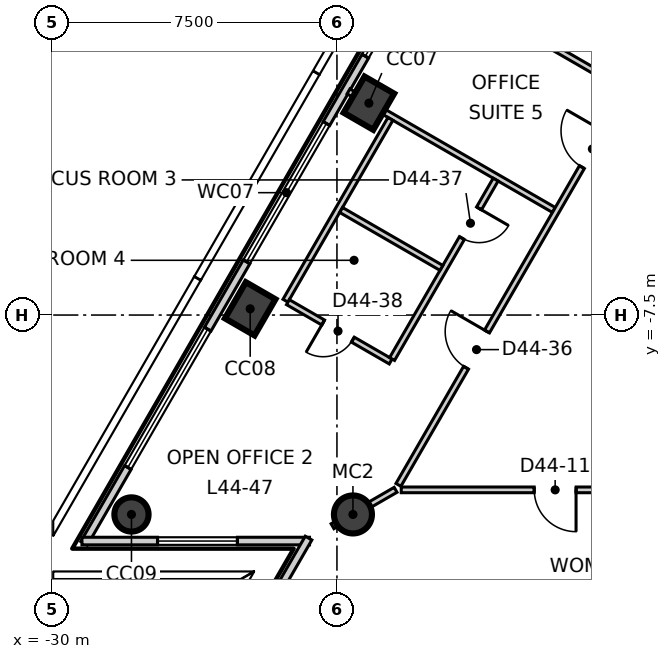
"""IFC4 building model, lengths in metres.
Left out: names, types, materials, properties, quantities, classifications, styles, units other than length and angle.
Written with IfcOpenShell. Run it as: python <this file> out.ifc"""

import sys

from ifc_helpers import new_model, si_unit, direction, frame, frame_2d, origin, origin_2d, place, context, subcontext, project, spatial, rectangle, circle, extrude, element, fill, save


model = new_model("IFC4")
c1 = context("Model", 3, precision=1e-05, world=origin(), true_north=direction((0.0, 1.0)))
c2 = subcontext(c1, "Body", "Model", "MODEL_VIEW")
j1 = project(units=[si_unit("LENGTHUNIT", "METRE"), si_unit("PLANEANGLEUNIT", "RADIAN")], contexts=[c1])
p1 = place(None, origin())
s1 = spatial("IfcSite", under=j1, at=p1, CompositionType="ELEMENT")
p2 = place(p1, origin())
s2 = spatial("IfcBuilding", under=s1, at=p2, CompositionType="ELEMENT")
p3 = place(p2, frame((0.0, 0.0, 191.3)))
s3 = spatial("IfcBuildingStorey", under=s2, at=p3, CompositionType="ELEMENT", Elevation=191.3)
for number, where, z_axis, x_axis in (
    (1, (-21.659, -1.925, -0.3), (0.0, 0.0, 1.0), (0.5, 0.866, 0.0)),
    (2, (-24.783, -7.336, -0.3), (0.0, 0.0, 1.0), (0.5, 0.866, 0.0)),
):
    element("IfcColumn", number, at=place(p3, frame(where, z_axis=z_axis, x_axis=x_axis)), inside=s3, PredefinedType="COLUMN", context=c2, shape_type="SweptSolid", body=[
        extrude(rectangle(XDim=1.1, YDim=0.9, at=origin_2d()), origin(), (0.0, 0.0, 1.0), 4.0),
    ])
p4 = place(p3, frame((-27.907, -12.747, -0.3), z_axis=(0.0, 0.0, 1.0), x_axis=(0.5, 0.866025403784, 0.0)))
e3 = element("IfcColumn", 3, at=p4, inside=s3, PredefinedType="COLUMN", context=c2, shape_type="SweptSolid", body=[
    extrude(circle(Radius=0.45, at=origin_2d()), origin(), (0.0, 0.0, 1.0), 4.0),
])
p5 = place(p3, frame((-22.079, -12.747, -0.3), z_axis=(0.0, 0.0, 1.0), x_axis=(1.0, 0.0, 0.0)))
e4 = element("IfcColumn", 4, at=p5, inside=s3, PredefinedType="COLUMN", context=c2, shape_type="SweptSolid", body=[
    extrude(circle(Radius=0.5, at=origin_2d()), origin(), (0.0, 0.0, 1.0), 4.0),
])
p6 = place(p3, frame((-2.869, 32.02, 0.0), z_axis=(0.0, 0.0, 1.0), x_axis=(-0.500006930241, -0.866021402571, 0.0)))
e5 = element("IfcWall", 5, at=p6, inside=s3, PredefinedType="ELEMENTEDWALL", context=c2, shape_type="SweptSolid", body=[
    extrude(rectangle(XDim=52.572, YDim=0.2, at=frame_2d((26.286, 0.0))), origin(), (0.0, 0.0, 1.0), 3.7),
])
p7 = place(p6, frame((2.327, 0.0, 0.9)))
e6 = element("IfcOpeningElement", 6, at=p7, cuts=e5, PredefinedType="OPENING", context=c2, shape_type="SweptSolid", body=[
    extrude(rectangle(XDim=4.2, YDim=2.5, at=frame_2d((2.1, 1.25))), frame((0.0, 0.11, 0.0), z_axis=(0.0, -1.0, 0.0), x_axis=(1.0, 0.0, 0.0)), (0.0, 0.0, 1.0), 0.22),
])
p8 = place(p6, frame((8.575, 0.0, 0.9)))
e7 = element("IfcOpeningElement", 7, at=p8, cuts=e5, PredefinedType="OPENING", context=c2, shape_type="SweptSolid", body=[
    extrude(rectangle(XDim=4.2, YDim=2.5, at=frame_2d((2.1, 1.25))), frame((0.0, 0.11, 0.0), z_axis=(0.0, -1.0, 0.0), x_axis=(1.0, 0.0, 0.0)), (0.0, 0.0, 1.0), 0.22),
])
p9 = place(p6, frame((14.823, 0.0, 0.9)))
e8 = element("IfcOpeningElement", 8, at=p9, cuts=e5, PredefinedType="OPENING", context=c2, shape_type="SweptSolid", body=[
    extrude(rectangle(XDim=4.2, YDim=2.5, at=frame_2d((2.1, 1.25))), frame((0.0, 0.11, 0.0), z_axis=(0.0, -1.0, 0.0), x_axis=(1.0, 0.0, 0.0)), (0.0, 0.0, 1.0), 0.22),
])
p10 = place(p6, frame((21.071, 0.0, 0.9)))
e9 = element("IfcOpeningElement", 9, at=p10, cuts=e5, PredefinedType="OPENING", context=c2, shape_type="SweptSolid", body=[
    extrude(rectangle(XDim=4.2, YDim=2.5, at=frame_2d((2.1, 1.25))), frame((0.0, 0.11, 0.0), z_axis=(0.0, -1.0, 0.0), x_axis=(1.0, 0.0, 0.0)), (0.0, 0.0, 1.0), 0.22),
])
p11 = place(p6, frame((27.319, 0.0, 0.9)))
e10 = element("IfcOpeningElement", 10, at=p11, cuts=e5, PredefinedType="OPENING", context=c2, shape_type="SweptSolid", body=[
    extrude(rectangle(XDim=4.2, YDim=2.5, at=frame_2d((2.1, 1.25))), frame((0.0, 0.11, 0.0), z_axis=(0.0, -1.0, 0.0), x_axis=(1.0, 0.0, 0.0)), (0.0, 0.0, 1.0), 0.22),
])
p12 = place(p6, frame((33.568, 0.0, 0.9)))
e11 = element("IfcOpeningElement", 11, at=p12, cuts=e5, PredefinedType="OPENING", context=c2, shape_type="SweptSolid", body=[
    extrude(rectangle(XDim=4.2, YDim=2.5, at=frame_2d((2.1, 1.25))), frame((0.0, 0.11, 0.0), z_axis=(0.0, -1.0, 0.0), x_axis=(1.0, 0.0, 0.0)), (0.0, 0.0, 1.0), 0.22),
])
p13 = place(p6, frame((39.816, 0.0, 0.9)))
e12 = element("IfcOpeningElement", 12, at=p13, cuts=e5, PredefinedType="OPENING", context=c2, shape_type="SweptSolid", body=[
    extrude(rectangle(XDim=4.2, YDim=2.5, at=frame_2d((2.1, 1.25))), frame((0.0, 0.11, 0.0), z_axis=(0.0, -1.0, 0.0), x_axis=(1.0, 0.0, 0.0)), (0.0, 0.0, 1.0), 0.22),
])
p14 = place(p6, frame((46.064, 0.0, 0.9)))
e13 = element("IfcOpeningElement", 13, at=p14, cuts=e5, PredefinedType="OPENING", context=c2, shape_type="SweptSolid", body=[
    extrude(rectangle(XDim=4.2, YDim=2.5, at=frame_2d((2.1, 1.25))), frame((0.0, 0.11, 0.0), z_axis=(0.0, -1.0, 0.0), x_axis=(1.0, 0.0, 0.0)), (0.0, 0.0, 1.0), 0.22),
])
p15 = place(p3, frame((-29.21, -13.447, 0.0), z_axis=(0.0, 0.0, 1.0), x_axis=(1.0, 0.0, 0.0)))
e14 = element("IfcWall", 14, at=p15, inside=s3, PredefinedType="ELEMENTEDWALL", context=c2, shape_type="SweptSolid", body=[
    extrude(rectangle(XDim=5.988, YDim=0.2, at=frame_2d((2.994, 0.0))), origin(), (0.0, 0.0, 1.0), 3.7),
])
p16 = place(p15, frame((1.99, 0.0, 0.9)))
e15 = element("IfcOpeningElement", 15, at=p16, cuts=e14, PredefinedType="OPENING", context=c2, shape_type="SweptSolid", body=[
    extrude(rectangle(XDim=2.1, YDim=2.5, at=frame_2d((1.05, 1.25))), frame((0.0, 0.11, 0.0), z_axis=(0.0, -1.0, 0.0), x_axis=(1.0, 0.0, 0.0)), (0.0, 0.0, 1.0), 0.22),
])
p17 = place(p3, frame((-23.247, -13.369, 0.0), z_axis=(0.0, 0.0, 1.0), x_axis=(-0.499896541353, -0.866085127423, 0.0)))
e16 = element("IfcWall", 16, at=p17, inside=s3, PredefinedType="ELEMENTEDWALL", context=c2, shape_type="SweptSolid", body=[
    extrude(rectangle(XDim=5.989, YDim=0.2, at=frame_2d((2.995, 0.0))), origin(), (0.0, 0.0, 1.0), 3.7),
])
p18 = place(p17, frame((1.39, 0.0, 0.9)))
e17 = element("IfcOpeningElement", 17, at=p18, cuts=e16, PredefinedType="OPENING", context=c2, shape_type="SweptSolid", body=[
    extrude(rectangle(XDim=2.1, YDim=2.5, at=frame_2d((1.05, 1.25))), frame((0.0, 0.11, 0.0), z_axis=(0.0, -1.0, 0.0), x_axis=(1.0, 0.0, 0.0)), (0.0, 0.0, 1.0), 0.22),
])
p19 = place(p3, frame((-22.616, -13.057, 0.0), z_axis=(0.0, 0.0, 1.0), x_axis=(0.866030650962, 0.499990911512, 0.0)))
e18 = element("IfcWall", 18, at=p19, inside=s3, PredefinedType="PARTITIONING", context=c2, shape_type="SweptSolid", body=[
    extrude(rectangle(XDim=1.916, YDim=0.15, at=frame_2d((0.958, 0.0))), origin(), (0.0, 0.0, 1.0), 3.2),
])
p20 = place(p3, frame((-22.196, -1.615, 0.0), z_axis=(0.0, 0.0, 1.0), x_axis=(0.86601944389, -0.500010322698, 0.0)))
e19 = element("IfcWall", 19, at=p20, inside=s3, PredefinedType="PARTITIONING", context=c2, shape_type="SweptSolid", body=[
    extrude(rectangle(XDim=6.24, YDim=0.15, at=frame_2d((3.12, 0.0))), origin(), (0.0, 0.0, 1.0), 3.7),
])
p21 = place(p3, frame((-20.882, -11.969, 0.0), z_axis=(0.0, 0.0, 1.0), x_axis=(0.499998738735, 0.866026131975, 0.0)))
e20 = element("IfcWall", 20, at=p21, inside=s3, PredefinedType="PARTITIONING", context=c2, shape_type="SweptSolid", body=[
    extrude(rectangle(XDim=41.764, YDim=0.15, at=frame_2d((20.882, 0.0))), origin(), (0.0, 0.0, 1.0), 3.7),
])
p22 = place(p21, frame((37.014, 0.0, 0.0)))
e21 = element("IfcOpeningElement", 21, at=p22, cuts=e20, PredefinedType="OPENING", context=c2, shape_type="SweptSolid", body=[
    extrude(rectangle(XDim=1.0, YDim=2.1, at=frame_2d((0.5, 1.05))), frame((0.0, 0.085, 0.0), z_axis=(0.0, -1.0, 0.0), x_axis=(1.0, 0.0, 0.0)), (0.0, 0.0, 1.0), 0.17),
])
p23 = place(p21, frame((29.653, 0.0, 0.0)))
e22 = element("IfcOpeningElement", 22, at=p23, cuts=e20, PredefinedType="OPENING", context=c2, shape_type="SweptSolid", body=[
    extrude(rectangle(XDim=1.0, YDim=2.1, at=frame_2d((0.5, 1.05))), frame((0.0, 0.085, 0.0), z_axis=(0.0, -1.0, 0.0), x_axis=(1.0, 0.0, 0.0)), (0.0, 0.0, 1.0), 0.17),
])
p24 = place(p21, frame((23.405, 0.0, 0.0)))
e23 = element("IfcOpeningElement", 23, at=p24, cuts=e20, PredefinedType="OPENING", context=c2, shape_type="SweptSolid", body=[
    extrude(rectangle(XDim=1.0, YDim=2.1, at=frame_2d((0.5, 1.05))), frame((0.0, 0.085, 0.0), z_axis=(0.0, -1.0, 0.0), x_axis=(1.0, 0.0, 0.0)), (0.0, 0.0, 1.0), 0.17),
])
p25 = place(p21, frame((9.657, 0.0, 0.0)))
e24 = element("IfcOpeningElement", 24, at=p25, cuts=e20, PredefinedType="OPENING", context=c2, shape_type="SweptSolid", body=[
    extrude(rectangle(XDim=1.1, YDim=2.1, at=frame_2d((0.55, 1.05))), frame((0.0, 0.085, 0.0), z_axis=(0.0, -1.0, 0.0), x_axis=(1.0, 0.0, 0.0)), (0.0, 0.0, 1.0), 0.17),
])
p26 = place(p21, frame((18.757, 0.0, 0.0)))
e25 = element("IfcOpeningElement", 25, at=p26, cuts=e20, PredefinedType="OPENING", context=c2, shape_type="SweptSolid", body=[
    extrude(rectangle(XDim=0.9, YDim=2.1, at=frame_2d((0.45, 1.05))), frame((0.0, 0.085, 0.0), z_axis=(0.0, -1.0, 0.0), x_axis=(1.0, 0.0, 0.0)), (0.0, 0.0, 1.0), 0.17),
])
p27 = place(p21, frame((15.557, 0.0, 0.0)))
e26 = element("IfcOpeningElement", 26, at=p27, cuts=e20, PredefinedType="OPENING", context=c2, shape_type="SweptSolid", body=[
    extrude(rectangle(XDim=0.9, YDim=2.1, at=frame_2d((0.45, 1.05))), frame((0.0, 0.085, 0.0), z_axis=(0.0, -1.0, 0.0), x_axis=(1.0, 0.0, 0.0)), (0.0, 0.0, 1.0), 0.17),
])
p28 = place(p21, frame((12.657, 0.0, 0.0)))
e27 = element("IfcOpeningElement", 27, at=p28, cuts=e20, PredefinedType="OPENING", context=c2, shape_type="SweptSolid", body=[
    extrude(rectangle(XDim=1.0, YDim=2.1, at=frame_2d((0.5, 1.05))), frame((0.0, 0.085, 0.0), z_axis=(0.0, -1.0, 0.0), x_axis=(1.0, 0.0, 0.0)), (0.0, 0.0, 1.0), 0.17),
])
p29 = place(p21, frame((3.56, 0.0, 0.0)))
e28 = element("IfcOpeningElement", 28, at=p29, cuts=e20, PredefinedType="OPENING", context=c2, shape_type="SweptSolid", body=[
    extrude(rectangle(XDim=1.1, YDim=2.1, at=frame_2d((0.55, 1.05))), frame((0.0, 0.085, 0.0), z_axis=(0.0, -1.0, 0.0), x_axis=(1.0, 0.0, 0.0)), (0.0, 0.0, 1.0), 0.17),
])
p30 = place(p3, frame((-20.808, -12.1, 0.0), z_axis=(0.0, 0.0, 1.0), x_axis=(1.0, 0.0, 0.0)))
e29 = element("IfcWall", 29, at=p30, inside=s3, PredefinedType="PARTITIONING", context=c2, shape_type="SweptSolid", body=[
    extrude(rectangle(XDim=41.766, YDim=0.15, at=frame_2d((20.883, 0.0))), origin(), (0.0, 0.0, 1.0), 3.7),
])
p31 = place(p30, frame((3.5, 0.0, 0.0)))
e30 = element("IfcOpeningElement", 30, at=p31, cuts=e29, PredefinedType="OPENING", context=c2, shape_type="SweptSolid", body=[
    extrude(rectangle(XDim=1.1, YDim=2.1, at=frame_2d((0.55, 1.05))), frame((0.0, 0.085, 0.0), z_axis=(0.0, -1.0, 0.0), x_axis=(1.0, 0.0, 0.0)), (0.0, 0.0, 1.0), 0.17),
])
p32 = place(p30, frame((18.362, 0.0, 0.0)))
e31 = element("IfcOpeningElement", 31, at=p32, cuts=e29, PredefinedType="OPENING", context=c2, shape_type="SweptSolid", body=[
    extrude(rectangle(XDim=1.1, YDim=2.1, at=frame_2d((0.55, 1.05))), frame((0.0, 0.085, 0.0), z_axis=(0.0, -1.0, 0.0), x_axis=(1.0, 0.0, 0.0)), (0.0, 0.0, 1.0), 0.17),
])
p33 = place(p30, frame((9.462, 0.0, 0.0)))
e32 = element("IfcOpeningElement", 32, at=p33, cuts=e29, PredefinedType="OPENING", context=c2, shape_type="SweptSolid", body=[
    extrude(rectangle(XDim=0.9, YDim=2.1, at=frame_2d((0.45, 1.05))), frame((0.0, 0.085, 0.0), z_axis=(0.0, -1.0, 0.0), x_axis=(1.0, 0.0, 0.0)), (0.0, 0.0, 1.0), 0.17),
])
p34 = place(p30, frame((12.662, 0.0, 0.0)))
e33 = element("IfcOpeningElement", 33, at=p34, cuts=e29, PredefinedType="OPENING", context=c2, shape_type="SweptSolid", body=[
    extrude(rectangle(XDim=0.9, YDim=2.1, at=frame_2d((0.45, 1.05))), frame((0.0, 0.085, 0.0), z_axis=(0.0, -1.0, 0.0), x_axis=(1.0, 0.0, 0.0)), (0.0, 0.0, 1.0), 0.17),
])
p35 = place(p30, frame((15.362, 0.0, 0.0)))
e34 = element("IfcOpeningElement", 34, at=p35, cuts=e29, PredefinedType="OPENING", context=c2, shape_type="SweptSolid", body=[
    extrude(rectangle(XDim=1.0, YDim=2.1, at=frame_2d((0.5, 1.05))), frame((0.0, 0.085, 0.0), z_axis=(0.0, -1.0, 0.0), x_axis=(1.0, 0.0, 0.0)), (0.0, 0.0, 1.0), 0.17),
])
p36 = place(p30, frame((26.458, 0.0, 0.0)))
e35 = element("IfcOpeningElement", 35, at=p36, cuts=e29, PredefinedType="OPENING", context=c2, shape_type="SweptSolid", body=[
    extrude(rectangle(XDim=1.1, YDim=2.1, at=frame_2d((0.55, 1.05))), frame((0.0, 0.085, 0.0), z_axis=(0.0, -1.0, 0.0), x_axis=(1.0, 0.0, 0.0)), (0.0, 0.0, 1.0), 0.17),
])
p37 = place(p30, frame((36.955, 0.0, 0.0)))
e36 = element("IfcOpeningElement", 36, at=p37, cuts=e29, PredefinedType="OPENING", context=c2, shape_type="SweptSolid", body=[
    extrude(rectangle(XDim=1.1, YDim=2.1, at=frame_2d((0.55, 1.05))), frame((0.0, 0.085, 0.0), z_axis=(0.0, -1.0, 0.0), x_axis=(1.0, 0.0, 0.0)), (0.0, 0.0, 1.0), 0.17),
])
p38 = place(p3, frame((-17.583, -0.009, 0.0), z_axis=(0.0, 0.0, 1.0), x_axis=(0.866056215479, -0.499946628782, 0.0)))
e37 = element("IfcWall", 37, at=p38, inside=s3, PredefinedType="PARTITIONING", context=c2, shape_type="SweptSolid", body=[
    extrude(rectangle(XDim=3.048, YDim=0.15, at=frame_2d((1.524, 0.0))), origin(), (0.0, 0.0, 1.0), 3.7),
])
p39 = place(p3, frame((-23.855, -7.123, 0.0), z_axis=(0.0, 0.0, 1.0), x_axis=(0.499994082372, 0.866028820302, 0.0)))
e38 = element("IfcWall", 38, at=p39, inside=s3, PredefinedType="PARTITIONING", context=c2, shape_type="SweptSolid", body=[
    extrude(rectangle(XDim=5.524, YDim=0.15, at=frame_2d((2.762, 0.0))), origin(), (0.0, 0.0, 1.0), 3.7),
])
p40 = place(p3, frame((-23.79, -7.161, 0.0), z_axis=(0.0, 0.0, 1.0), x_axis=(0.866050172578, -0.499957096737, 0.0)))
e39 = element("IfcWall", 39, at=p40, inside=s3, PredefinedType="PARTITIONING", context=c2, shape_type="SweptSolid", body=[
    extrude(rectangle(XDim=3.122, YDim=0.15, at=frame_2d((1.561, 0.0))), origin(), (0.0, 0.0, 1.0), 3.7),
])
p41 = place(p40, frame((1.072, 0.0, 0.0)))
e40 = element("IfcOpeningElement", 40, at=p41, cuts=e39, PredefinedType="OPENING", context=c2, shape_type="SweptSolid", body=[
    extrude(rectangle(XDim=0.9, YDim=2.1, at=frame_2d((0.45, 1.05))), frame((0.0, 0.085, 0.0), z_axis=(0.0, -1.0, 0.0), x_axis=(1.0, 0.0, 0.0)), (0.0, 0.0, 1.0), 0.17),
])
p42 = place(p3, frame((-21.049, -8.657, 0.0), z_axis=(0.0, 0.0, 1.0), x_axis=(0.500002931134, 0.866023711487, 0.0)))
e41 = element("IfcWall", 41, at=p42, inside=s3, PredefinedType="PARTITIONING", context=c2, shape_type="SweptSolid", body=[
    extrude(rectangle(XDim=5.45, YDim=0.15, at=frame_2d((2.725, 0.0))), origin(), (0.0, 0.0, 1.0), 3.7),
])
p43 = place(p42, frame((3.675, 0.0, 0.0)))
e42 = element("IfcOpeningElement", 42, at=p43, cuts=e41, PredefinedType="OPENING", context=c2, shape_type="SweptSolid", body=[
    extrude(rectangle(XDim=0.9, YDim=2.1, at=frame_2d((0.45, 1.05))), frame((0.0, 0.085, 0.0), z_axis=(0.0, -1.0, 0.0), x_axis=(1.0, 0.0, 0.0)), (0.0, 0.0, 1.0), 0.17),
])
p44 = place(p3, frame((-22.39, -4.736, 0.0), z_axis=(0.0, 0.0, 1.0), x_axis=(0.865976105257, -0.500085377835, 0.0)))
e43 = element("IfcWall", 43, at=p44, inside=s3, PredefinedType="PARTITIONING", context=c2, shape_type="SweptSolid", body=[
    extrude(rectangle(XDim=3.047, YDim=0.15, at=frame_2d((1.524, 0.0))), origin(), (0.0, 0.0, 1.0), 3.7),
])
p45 = place(p12, origin())
e44 = element("IfcWindow", 44, at=p45, inside=s3, PartitioningType="SINGLE_PANEL", PredefinedType="WINDOW", context=c2, shape_type="SweptSolid", body=[
    extrude(rectangle(XDim=4.2, YDim=2.5, at=frame_2d((2.1, 1.25))), frame((0.0, 0.03, 0.0), z_axis=(0.0, -1.0, 0.0), x_axis=(1.0, 0.0, 0.0)), (0.0, 0.0, 1.0), 0.06),
])
fill(e11, e44)
p46 = place(p13, origin())
e45 = element("IfcWindow", 45, at=p46, inside=s3, PartitioningType="SINGLE_PANEL", PredefinedType="WINDOW", context=c2, shape_type="SweptSolid", body=[
    extrude(rectangle(XDim=4.2, YDim=2.5, at=frame_2d((2.1, 1.25))), frame((0.0, 0.03, 0.0), z_axis=(0.0, -1.0, 0.0), x_axis=(1.0, 0.0, 0.0)), (0.0, 0.0, 1.0), 0.06),
])
fill(e12, e45)
p47 = place(p14, origin())
e46 = element("IfcWindow", 46, at=p47, inside=s3, PartitioningType="SINGLE_PANEL", PredefinedType="WINDOW", context=c2, shape_type="SweptSolid", body=[
    extrude(rectangle(XDim=4.2, YDim=2.5, at=frame_2d((2.1, 1.25))), frame((0.0, 0.03, 0.0), z_axis=(0.0, -1.0, 0.0), x_axis=(1.0, 0.0, 0.0)), (0.0, 0.0, 1.0), 0.06),
])
fill(e13, e46)
p48 = place(p16, origin())
e47 = element("IfcWindow", 47, at=p48, inside=s3, PartitioningType="SINGLE_PANEL", PredefinedType="WINDOW", context=c2, shape_type="SweptSolid", body=[
    extrude(rectangle(XDim=2.1, YDim=2.5, at=frame_2d((1.05, 1.25))), frame((0.0, 0.03, 0.0), z_axis=(0.0, -1.0, 0.0), x_axis=(1.0, 0.0, 0.0)), (0.0, 0.0, 1.0), 0.06),
])
fill(e15, e47)
p49 = place(p31, origin())
e48 = element("IfcDoor", 48, at=p49, inside=s3, OperationType="SINGLE_SWING_RIGHT", PredefinedType="DOOR", context=c2, shape_type="SweptSolid", body=[
    extrude(rectangle(XDim=1.1, YDim=2.1, at=frame_2d((0.55, 1.05))), frame((0.0, 0.025, 0.0), z_axis=(0.0, -1.0, 0.0), x_axis=(1.0, 0.0, 0.0)), (0.0, 0.0, 1.0), 0.05),
])
fill(e30, e48)
p50 = place(p25, origin())
e49 = element("IfcDoor", 49, at=p50, inside=s3, OperationType="SINGLE_SWING_LEFT", PredefinedType="DOOR", context=c2, shape_type="SweptSolid", body=[
    extrude(rectangle(XDim=1.1, YDim=2.1, at=frame_2d((0.55, 1.05))), frame((0.0, 0.025, 0.0), z_axis=(0.0, -1.0, 0.0), x_axis=(1.0, 0.0, 0.0)), (0.0, 0.0, 1.0), 0.05),
])
fill(e24, e49)
p51 = place(p29, origin())
e50 = element("IfcDoor", 50, at=p51, inside=s3, OperationType="SINGLE_SWING_LEFT", PredefinedType="DOOR", context=c2, shape_type="SweptSolid", body=[
    extrude(rectangle(XDim=1.1, YDim=2.1, at=frame_2d((0.55, 1.05))), frame((0.0, 0.025, 0.0), z_axis=(0.0, -1.0, 0.0), x_axis=(1.0, 0.0, 0.0)), (0.0, 0.0, 1.0), 0.05),
])
fill(e28, e50)
p52 = place(p43, origin())
e51 = element("IfcDoor", 51, at=p52, inside=s3, OperationType="SINGLE_SWING_RIGHT", PredefinedType="DOOR", context=c2, shape_type="SweptSolid", body=[
    extrude(rectangle(XDim=0.9, YDim=2.1, at=frame_2d((0.45, 1.05))), frame((0.0, 0.025, 0.0), z_axis=(0.0, -1.0, 0.0), x_axis=(1.0, 0.0, 0.0)), (0.0, 0.0, 1.0), 0.05),
])
fill(e42, e51)
p53 = place(p41, origin())
e52 = element("IfcDoor", 52, at=p53, inside=s3, OperationType="SINGLE_SWING_LEFT", PredefinedType="DOOR", context=c2, shape_type="SweptSolid", body=[
    extrude(rectangle(XDim=0.9, YDim=2.1, at=frame_2d((0.45, 1.05))), frame((0.0, 0.025, 0.0), z_axis=(0.0, -1.0, 0.0), x_axis=(1.0, 0.0, 0.0)), (0.0, 0.0, 1.0), 0.05),
])
fill(e40, e52)
save(model, sys.argv[1])
